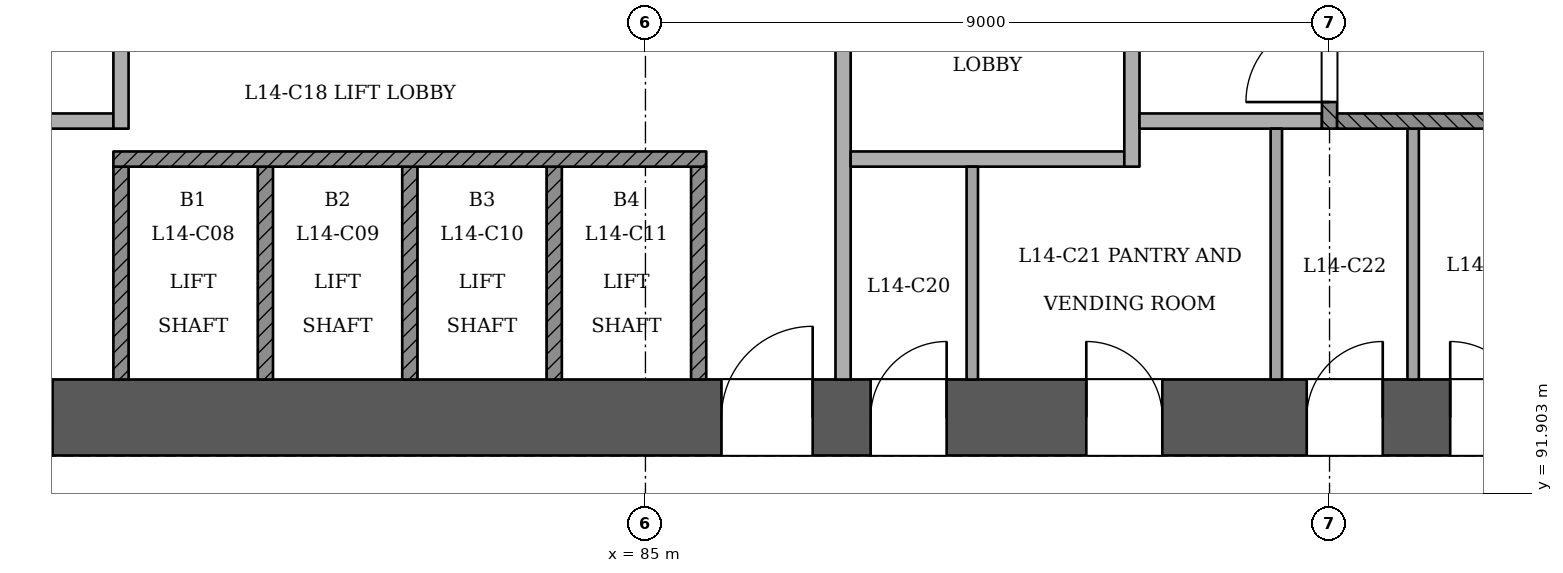
"""IFC4 building model, lengths in metres.
Left out: names, types, materials, properties, quantities, classifications, styles, units other than length and angle.
Written with IfcOpenShell. Run it as: python <this file> out.ifc"""

import sys

from ifc_helpers import new_model, si_unit, direction, frame, frame_2d, origin, place, context, subcontext, project, spatial, rectangle, extrude, element, fill, save


model = new_model("IFC4")
c1 = context("Model", 3, precision=1e-05, world=origin(), true_north=direction((0.0, 1.0)))
c2 = subcontext(c1, "Body", "Model", "MODEL_VIEW")
j1 = project(units=[si_unit("LENGTHUNIT", "METRE"), si_unit("PLANEANGLEUNIT", "RADIAN")], contexts=[c1])
p1 = place(None, origin())
s1 = spatial("IfcSite", under=j1, at=p1, CompositionType="ELEMENT")
p2 = place(p1, origin())
s2 = spatial("IfcBuilding", under=s1, at=p2, CompositionType="ELEMENT")
p3 = place(p2, frame((0.0, 0.0, 59.4)))
s3 = spatial("IfcBuildingStorey", under=s2, at=p3, CompositionType="ELEMENT", Elevation=59.4)
p4 = place(p3, frame((72.5, 92.9, 0.0), z_axis=(0.0, 0.0, 1.0), x_axis=(1.0, 0.0, 0.0)))
e1 = element("IfcWall", 1, at=p4, inside=s3, PredefinedType="SHEAR", context=c2, shape_type="SweptSolid", body=[
    extrude(rectangle(XDim=25.5, YDim=1.0, at=frame_2d((12.75, 0.0))), origin(), (0.0, 0.0, 1.0), 3.6),
])
p5 = place(p4, frame((1.3, 0.0, 0.0)))
e2 = element("IfcOpeningElement", 2, at=p5, cuts=e1, PredefinedType="OPENING", context=c2, shape_type="SweptSolid", body=[
    extrude(rectangle(XDim=1.2, YDim=2.1, at=frame_2d((0.6, 1.05))), frame((0.0, 0.51, 0.0), z_axis=(0.0, -1.0, 0.0), x_axis=(1.0, 0.0, 0.0)), (0.0, 0.0, 1.0), 1.021),
])
p6 = place(p4, frame((3.5, 0.0, 0.0)))
e3 = element("IfcOpeningElement", 3, at=p6, cuts=e1, PredefinedType="OPENING", context=c2, shape_type="SweptSolid", body=[
    extrude(rectangle(XDim=1.2, YDim=2.1, at=frame_2d((0.6, 1.05))), frame((0.0, 0.51, 0.0), z_axis=(0.0, -1.0, 0.0), x_axis=(1.0, 0.0, 0.0)), (0.0, 0.0, 1.0), 1.021),
])
p7 = place(p4, frame((13.5, 0.0, 0.0)))
e4 = element("IfcOpeningElement", 4, at=p7, cuts=e1, PredefinedType="OPENING", context=c2, shape_type="SweptSolid", body=[
    extrude(rectangle(XDim=1.2, YDim=2.1, at=frame_2d((0.6, 1.05))), frame((0.0, 0.51, 0.0), z_axis=(0.0, -1.0, 0.0), x_axis=(1.0, 0.0, 0.0)), (0.0, 0.0, 1.0), 1.021),
])
p8 = place(p4, frame((15.462, 0.0, 0.0)))
e5 = element("IfcOpeningElement", 5, at=p8, cuts=e1, PredefinedType="OPENING", context=c2, shape_type="SweptSolid", body=[
    extrude(rectangle(XDim=1.0, YDim=2.1, at=frame_2d((0.5, 1.05))), frame((0.0, 0.51, 0.0), z_axis=(0.0, -1.0, 0.0), x_axis=(1.0, 0.0, 0.0)), (0.0, 0.0, 1.0), 1.021),
])
p9 = place(p4, frame((18.3, 0.0, 0.0)))
e6 = element("IfcOpeningElement", 6, at=p9, cuts=e1, PredefinedType="OPENING", context=c2, shape_type="SweptSolid", body=[
    extrude(rectangle(XDim=1.0, YDim=2.1, at=frame_2d((0.5, 1.05))), frame((0.0, 0.51, 0.0), z_axis=(0.0, -1.0, 0.0), x_axis=(1.0, 0.0, 0.0)), (0.0, 0.0, 1.0), 1.021),
])
p10 = place(p4, frame((21.2, 0.0, 0.0)))
e7 = element("IfcOpeningElement", 7, at=p10, cuts=e1, PredefinedType="OPENING", context=c2, shape_type="SweptSolid", body=[
    extrude(rectangle(XDim=1.0, YDim=2.1, at=frame_2d((0.5, 1.05))), frame((0.0, 0.51, 0.0), z_axis=(0.0, -1.0, 0.0), x_axis=(1.0, 0.0, 0.0)), (0.0, 0.0, 1.0), 1.021),
])
p11 = place(p4, frame((23.087, 0.0, 0.0)))
e8 = element("IfcOpeningElement", 8, at=p11, cuts=e1, PredefinedType="OPENING", context=c2, shape_type="SweptSolid", body=[
    extrude(rectangle(XDim=1.0, YDim=2.1, at=frame_2d((0.5, 1.05))), frame((0.0, 0.51, 0.0), z_axis=(0.0, -1.0, 0.0), x_axis=(1.0, 0.0, 0.0)), (0.0, 0.0, 1.0), 1.021),
])
p12 = place(p3, frame((62.256, 96.887, 0.0), z_axis=(0.0, 0.0, 1.0), x_axis=(0.500001966348, -0.86602426851, 0.0)))
e9 = element("IfcWall", 9, at=p12, inside=s3, PredefinedType="PARTITIONING", context=c2, shape_type="SweptSolid", body=[
    extrude(rectangle(XDim=43.626, YDim=0.15, at=frame_2d((21.813, 0.0))), origin(), (0.0, 0.0, 1.0), 2.7),
])
p13 = place(p12, frame((3.556, 0.0, 0.0)))
e10 = element("IfcOpeningElement", 10, at=p13, cuts=e9, PredefinedType="OPENING", context=c2, shape_type="SweptSolid", body=[
    extrude(rectangle(XDim=1.2, YDim=2.1, at=frame_2d((0.6, 1.05))), frame((0.0, 0.085, 0.0), z_axis=(0.0, -1.0, 0.0), x_axis=(1.0, 0.0, 0.0)), (0.0, 0.0, 1.0), 0.171),
])
p14 = place(p12, frame((12.213, 0.0, 0.0)))
e11 = element("IfcOpeningElement", 11, at=p14, cuts=e9, PredefinedType="OPENING", context=c2, shape_type="SweptSolid", body=[
    extrude(rectangle(XDim=1.2, YDim=2.1, at=frame_2d((0.6, 1.05))), frame((0.0, 0.085, 0.0), z_axis=(0.0, -1.0, 0.0), x_axis=(1.0, 0.0, 0.0)), (0.0, 0.0, 1.0), 0.171),
])
p15 = place(p12, frame((19.063, 0.0, 0.0)))
e12 = element("IfcOpeningElement", 12, at=p15, cuts=e9, PredefinedType="OPENING", context=c2, shape_type="SweptSolid", body=[
    extrude(rectangle(XDim=1.0, YDim=2.1, at=frame_2d((0.5, 1.05))), frame((0.0, 0.085, 0.0), z_axis=(0.0, -1.0, 0.0), x_axis=(1.0, 0.0, 0.0)), (0.0, 0.0, 1.0), 0.171),
])
p16 = place(p12, frame((27.963, 0.0, 0.0)))
e13 = element("IfcOpeningElement", 13, at=p16, cuts=e9, PredefinedType="OPENING", context=c2, shape_type="SweptSolid", body=[
    extrude(rectangle(XDim=1.2, YDim=2.1, at=frame_2d((0.6, 1.05))), frame((0.0, 0.085, 0.0), z_axis=(0.0, -1.0, 0.0), x_axis=(1.0, 0.0, 0.0)), (0.0, 0.0, 1.0), 0.171),
])
p17 = place(p12, frame((38.869, 0.0, 0.0)))
e14 = element("IfcOpeningElement", 14, at=p17, cuts=e9, PredefinedType="OPENING", context=c2, shape_type="SweptSolid", body=[
    extrude(rectangle(XDim=1.2, YDim=2.1, at=frame_2d((0.6, 1.05))), frame((0.0, 0.085, 0.0), z_axis=(0.0, -1.0, 0.0), x_axis=(1.0, 0.0, 0.0)), (0.0, 0.0, 1.0), 0.171),
])
p18 = place(p3, frame((85.931, 59.106, 0.0), z_axis=(0.0, 0.0, 1.0), x_axis=(0.499999543107, 0.866025667572, 0.0)))
e15 = element("IfcWall", 15, at=p18, inside=s3, PredefinedType="PARTITIONING", context=c2, shape_type="SweptSolid", body=[
    extrude(rectangle(XDim=43.626, YDim=0.15, at=frame_2d((21.813, 0.0))), origin(), (0.0, 0.0, 1.0), 2.7),
])
p19 = place(p18, frame((3.556, 0.0, 0.0)))
e16 = element("IfcOpeningElement", 16, at=p19, cuts=e15, PredefinedType="OPENING", context=c2, shape_type="SweptSolid", body=[
    extrude(rectangle(XDim=1.2, YDim=2.1, at=frame_2d((0.6, 1.05))), frame((0.0, 0.085, 0.0), z_axis=(0.0, -1.0, 0.0), x_axis=(1.0, 0.0, 0.0)), (0.0, 0.0, 1.0), 0.171),
])
p20 = place(p18, frame((14.463, 0.0, 0.0)))
e17 = element("IfcOpeningElement", 17, at=p20, cuts=e15, PredefinedType="OPENING", context=c2, shape_type="SweptSolid", body=[
    extrude(rectangle(XDim=1.2, YDim=2.1, at=frame_2d((0.6, 1.05))), frame((0.0, 0.085, 0.0), z_axis=(0.0, -1.0, 0.0), x_axis=(1.0, 0.0, 0.0)), (0.0, 0.0, 1.0), 0.171),
])
p21 = place(p18, frame((27.963, 0.0, 0.0)))
e18 = element("IfcOpeningElement", 18, at=p21, cuts=e15, PredefinedType="OPENING", context=c2, shape_type="SweptSolid", body=[
    extrude(rectangle(XDim=1.2, YDim=2.1, at=frame_2d((0.6, 1.05))), frame((0.0, 0.085, 0.0), z_axis=(0.0, -1.0, 0.0), x_axis=(1.0, 0.0, 0.0)), (0.0, 0.0, 1.0), 0.171),
])
p22 = place(p18, frame((38.869, 0.0, 0.0)))
e19 = element("IfcOpeningElement", 19, at=p22, cuts=e15, PredefinedType="OPENING", context=c2, shape_type="SweptSolid", body=[
    extrude(rectangle(XDim=1.2, YDim=2.1, at=frame_2d((0.6, 1.05))), frame((0.0, 0.085, 0.0), z_axis=(0.0, -1.0, 0.0), x_axis=(1.0, 0.0, 0.0)), (0.0, 0.0, 1.0), 0.171),
])
for number, where, z_axis, x_axis in (
    (20, (78.1, 93.4, 0.0), (0.0, 0.0, 1.0), (0.0, 1.0, 0.0)),
    (21, (80.0, 93.4, 0.0), (0.0, 0.0, 1.0), (0.0, 1.0, 0.0)),
    (22, (81.9, 93.4, 0.0), (0.0, 0.0, 1.0), (0.0, 1.0, 0.0)),
    (23, (83.8, 93.4, 0.0), (0.0, 0.0, 1.0), (0.0, 1.0, 0.0)),
    (24, (85.7, 93.4, 0.0), (0.0, 0.0, 1.0), (0.0, 1.0, 0.0)),
):
    element("IfcWall", number, at=place(p3, frame(where, z_axis=z_axis, x_axis=x_axis)), inside=s3, PredefinedType="SOLIDWALL", context=c2, shape_type="SweptSolid", body=[
        extrude(rectangle(XDim=2.8, YDim=0.2, at=frame_2d((1.4, 0.0))), origin(), (0.0, 0.0, 1.0), 3.1),
    ])
p23 = place(p3, frame((87.6, 93.4, 0.0), z_axis=(0.0, 0.0, 1.0), x_axis=(0.0, 1.0, 0.0)))
e25 = element("IfcWall", 25, at=p23, inside=s3, PredefinedType="PARTITIONING", context=c2, shape_type="SweptSolid", body=[
    extrude(rectangle(XDim=7.0, YDim=0.2, at=frame_2d((3.5, 0.0))), origin(), (0.0, 0.0, 1.0), 3.1),
])
p24 = place(p23, frame((4.45, 0.0, 0.0)))
e26 = element("IfcOpeningElement", 26, at=p24, cuts=e25, PredefinedType="OPENING", context=c2, shape_type="SweptSolid", body=[
    extrude(rectangle(XDim=1.1, YDim=2.1, at=frame_2d((0.55, 1.05))), frame((0.0, 0.11, 0.0), z_axis=(0.0, -1.0, 0.0), x_axis=(1.0, 0.0, 0.0)), (0.0, 0.0, 1.0), 0.221),
])
p25 = place(p3, frame((89.3, 93.4, 0.0), z_axis=(0.0, 0.0, 1.0), x_axis=(0.0, 1.0, 0.0)))
e27 = element("IfcWall", 27, at=p25, inside=s3, PredefinedType="PARTITIONING", context=c2, shape_type="SweptSolid", body=[
    extrude(rectangle(XDim=2.8, YDim=0.15, at=frame_2d((1.4, 0.0))), origin(), (0.0, 0.0, 1.0), 3.1),
])
for number, where, z_axis, x_axis in (
    (28, (93.3, 93.4, 0.0), (0.0, 0.0, 1.0), (0.0, 1.0, 0.0)),
    (29, (95.1, 93.4, 0.0), (0.0, 0.0, 1.0), (0.0, 1.0, 0.0)),
):
    element("IfcWall", number, at=place(p3, frame(where, z_axis=z_axis, x_axis=x_axis)), inside=s3, PredefinedType="PARTITIONING", context=c2, shape_type="SweptSolid", body=[
        extrude(rectangle(XDim=3.3, YDim=0.15, at=frame_2d((1.65, 0.0))), origin(), (0.0, 0.0, 1.0), 3.1),
    ])
p26 = place(p3, frame((78.0, 96.3, 0.0), z_axis=(0.0, 0.0, 1.0), x_axis=(1.0, 0.0, 0.0)))
e30 = element("IfcWall", 30, at=p26, inside=s3, PredefinedType="SOLIDWALL", context=c2, shape_type="SweptSolid", body=[
    extrude(rectangle(XDim=7.8, YDim=0.2, at=frame_2d((3.9, 0.0))), origin(), (0.0, 0.0, 1.0), 3.1),
])
p27 = place(p3, frame((87.7, 96.3, 0.0), z_axis=(0.0, 0.0, 1.0), x_axis=(1.0, 0.0, 0.0)))
e31 = element("IfcWall", 31, at=p27, inside=s3, PredefinedType="PARTITIONING", context=c2, shape_type="SweptSolid", body=[
    extrude(rectangle(XDim=3.6, YDim=0.2, at=frame_2d((1.8, 0.0))), origin(), (0.0, 0.0, 1.0), 3.1),
])
p28 = place(p3, frame((91.4, 96.2, 0.0), z_axis=(0.0, 0.0, 1.0), x_axis=(0.0, 1.0, 0.0)))
e32 = element("IfcWall", 32, at=p28, inside=s3, PredefinedType="PARTITIONING", context=c2, shape_type="SweptSolid", body=[
    extrude(rectangle(XDim=4.2, YDim=0.2, at=frame_2d((2.1, 0.0))), origin(), (0.0, 0.0, 1.0), 3.1),
])
p29 = place(p28, frame((2.45, 0.0, 0.0)))
e33 = element("IfcOpeningElement", 33, at=p29, cuts=e32, PredefinedType="OPENING", context=c2, shape_type="SweptSolid", body=[
    extrude(rectangle(XDim=1.1, YDim=2.1, at=frame_2d((0.55, 1.05))), frame((0.0, 0.11, 0.0), z_axis=(0.0, -1.0, 0.0), x_axis=(1.0, 0.0, 0.0)), (0.0, 0.0, 1.0), 0.221),
])
p30 = place(p3, frame((76.1, 96.8, 0.0), z_axis=(0.0, 0.0, 1.0), x_axis=(1.0, 0.0, 0.0)))
e34 = element("IfcWall", 34, at=p30, inside=s3, PredefinedType="PARTITIONING", context=c2, shape_type="SweptSolid", body=[
    extrude(rectangle(XDim=1.9, YDim=0.2, at=frame_2d((0.95, 0.0))), origin(), (0.0, 0.0, 1.0), 3.1),
])
p31 = place(p3, frame((78.1, 96.7, 0.0), z_axis=(0.0, 0.0, 1.0), x_axis=(0.0, 1.0, 0.0)))
e35 = element("IfcWall", 35, at=p31, inside=s3, PredefinedType="PARTITIONING", context=c2, shape_type="SweptSolid", body=[
    extrude(rectangle(XDim=3.7, YDim=0.2, at=frame_2d((1.85, 0.0))), origin(), (0.0, 0.0, 1.0), 3.1),
])
p32 = place(p31, frame((1.95, 0.0, 0.0)))
e36 = element("IfcOpeningElement", 36, at=p32, cuts=e35, PredefinedType="OPENING", context=c2, shape_type="SweptSolid", body=[
    extrude(rectangle(XDim=1.1, YDim=2.1, at=frame_2d((0.55, 1.05))), frame((0.0, 0.11, 0.0), z_axis=(0.0, -1.0, 0.0), x_axis=(1.0, 0.0, 0.0)), (0.0, 0.0, 1.0), 0.221),
])
p33 = place(p3, frame((91.5, 96.8, 0.0), z_axis=(0.0, 0.0, 1.0), x_axis=(1.0, 0.0, 0.0)))
e37 = element("IfcWall", 37, at=p33, inside=s3, PredefinedType="PARTITIONING", context=c2, shape_type="SweptSolid", body=[
    extrude(rectangle(XDim=2.4, YDim=0.2, at=frame_2d((1.2, 0.0))), origin(), (0.0, 0.0, 1.0), 3.1),
])
p34 = place(p3, frame((94.0, 96.7, 0.0), z_axis=(0.0, 0.0, 1.0), x_axis=(0.0, 1.0, 0.0)))
e38 = element("IfcWall", 38, at=p34, inside=s3, PredefinedType="SOLIDWALL", context=c2, shape_type="SweptSolid", body=[
    extrude(rectangle(XDim=3.7, YDim=0.2, at=frame_2d((1.85, 0.0))), origin(), (0.0, 0.0, 1.0), 3.1),
])
p35 = place(p34, frame((0.35, 0.0, 0.0)))
e39 = element("IfcOpeningElement", 39, at=p35, cuts=e38, PredefinedType="OPENING", context=c2, shape_type="SweptSolid", body=[
    extrude(rectangle(XDim=1.1, YDim=2.1, at=frame_2d((0.55, 1.05))), frame((0.0, 0.11, 0.0), z_axis=(0.0, -1.0, 0.0), x_axis=(1.0, 0.0, 0.0)), (0.0, 0.0, 1.0), 0.221),
])
p36 = place(p3, frame((94.1, 96.8, 0.0), z_axis=(0.0, 0.0, 1.0), x_axis=(1.0, 0.0, 0.0)))
e40 = element("IfcWall", 40, at=p36, inside=s3, PredefinedType="SOLIDWALL", context=c2, shape_type="SweptSolid", body=[
    extrude(rectangle(XDim=2.9, YDim=0.2, at=frame_2d((1.45, 0.0))), origin(), (0.0, 0.0, 1.0), 3.1),
])
p37 = place(p35, origin())
e41 = element("IfcDoor", 41, at=p37, inside=s3, OperationType="SINGLE_SWING_LEFT", PredefinedType="NOTDEFINED", context=c2, shape_type="SweptSolid", body=[
    extrude(rectangle(XDim=1.1, YDim=2.1, at=frame_2d((0.55, 1.05))), frame((0.0, 0.025, 0.0), z_axis=(0.0, -1.0, 0.0), x_axis=(1.0, 0.0, 0.0)), (0.0, 0.0, 1.0), 0.05),
])
fill(e39, e41)
p38 = place(p6, origin())
e42 = element("IfcDoor", 42, at=p38, inside=s3, OperationType="SINGLE_SWING_LEFT", PredefinedType="NOTDEFINED", context=c2, shape_type="SweptSolid", body=[
    extrude(rectangle(XDim=1.2, YDim=2.1, at=frame_2d((0.6, 1.05))), frame((0.0, 0.025, 0.0), z_axis=(0.0, -1.0, 0.0), x_axis=(1.0, 0.0, 0.0)), (0.0, 0.0, 1.0), 0.05),
])
fill(e3, e42)
p39 = place(p7, origin())
e43 = element("IfcDoor", 43, at=p39, inside=s3, OperationType="SINGLE_SWING_RIGHT", PredefinedType="NOTDEFINED", context=c2, shape_type="SweptSolid", body=[
    extrude(rectangle(XDim=1.2, YDim=2.1, at=frame_2d((0.6, 1.05))), frame((0.0, 0.025, 0.0), z_axis=(0.0, -1.0, 0.0), x_axis=(1.0, 0.0, 0.0)), (0.0, 0.0, 1.0), 0.05),
])
fill(e4, e43)
p40 = place(p8, origin())
e44 = element("IfcDoor", 44, at=p40, inside=s3, OperationType="SINGLE_SWING_RIGHT", PredefinedType="NOTDEFINED", context=c2, shape_type="SweptSolid", body=[
    extrude(rectangle(XDim=1.0, YDim=2.1, at=frame_2d((0.5, 1.05))), frame((0.0, 0.025, 0.0), z_axis=(0.0, -1.0, 0.0), x_axis=(1.0, 0.0, 0.0)), (0.0, 0.0, 1.0), 0.05),
])
fill(e5, e44)
p41 = place(p9, origin())
e45 = element("IfcDoor", 45, at=p41, inside=s3, OperationType="SINGLE_SWING_LEFT", PredefinedType="NOTDEFINED", context=c2, shape_type="SweptSolid", body=[
    extrude(rectangle(XDim=1.0, YDim=2.1, at=frame_2d((0.5, 1.05))), frame((0.0, 0.025, 0.0), z_axis=(0.0, -1.0, 0.0), x_axis=(1.0, 0.0, 0.0)), (0.0, 0.0, 1.0), 0.05),
])
fill(e6, e45)
p42 = place(p10, origin())
e46 = element("IfcDoor", 46, at=p42, inside=s3, OperationType="SINGLE_SWING_RIGHT", PredefinedType="NOTDEFINED", context=c2, shape_type="SweptSolid", body=[
    extrude(rectangle(XDim=1.0, YDim=2.1, at=frame_2d((0.5, 1.05))), frame((0.0, 0.025, 0.0), z_axis=(0.0, -1.0, 0.0), x_axis=(1.0, 0.0, 0.0)), (0.0, 0.0, 1.0), 0.05),
])
fill(e7, e46)
p43 = place(p11, origin())
e47 = element("IfcDoor", 47, at=p43, inside=s3, OperationType="SINGLE_SWING_LEFT", PredefinedType="NOTDEFINED", context=c2, shape_type="SweptSolid", body=[
    extrude(rectangle(XDim=1.0, YDim=2.1, at=frame_2d((0.5, 1.05))), frame((0.0, 0.025, 0.0), z_axis=(0.0, -1.0, 0.0), x_axis=(1.0, 0.0, 0.0)), (0.0, 0.0, 1.0), 0.05),
])
fill(e8, e47)
save(model, sys.argv[1])
